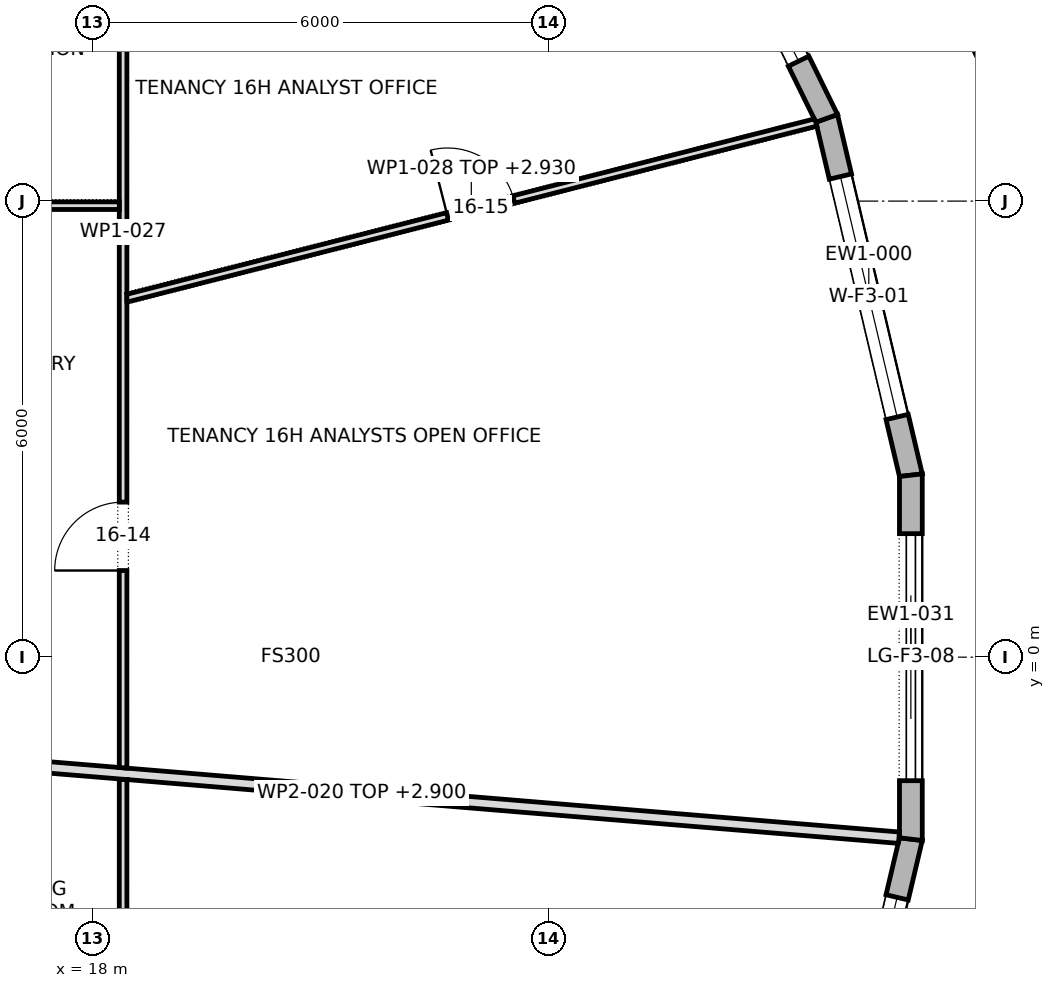
"""IFC4 building model, lengths in metres.
Left out: names, types, materials, properties, quantities, classifications, styles, units other than length and angle.
Written with IfcOpenShell. Run it as: python <this file> out.ifc"""

import sys

from ifc_helpers import new_model, si_unit, direction, frame, frame_2d, origin, origin_2d, place, context, subcontext, project, spatial, polyline, rectangle, outline, extrude, element, fill, save


model = new_model("IFC4")
c1 = context("Model", 3, precision=1e-05, world=origin(), true_north=direction((0.0, 1.0)))
c2 = subcontext(c1, "Body", "Model", "MODEL_VIEW")
j1 = project(units=[si_unit("LENGTHUNIT", "METRE"), si_unit("PLANEANGLEUNIT", "RADIAN")], contexts=[c1])
p1 = place(None, origin())
s1 = spatial("IfcSite", under=j1, at=p1, CompositionType="ELEMENT")
p2 = place(p1, origin())
s2 = spatial("IfcBuilding", under=s1, at=p2, CompositionType="ELEMENT")
p3 = place(p2, frame((0.0, 0.0, 226.9)))
s3 = spatial("IfcBuildingStorey", under=s2, at=p3, CompositionType="ELEMENT", Elevation=226.9)
p4 = place(p3, frame((30.194, 7.851, 0.0), z_axis=(0.0, 0.0, 1.0), x_axis=(-0.333630814899, 0.942703813162, 0.0)))
e1 = element("IfcColumn", 1, at=p4, inside=s3, PredefinedType="COLUMN", context=c2, shape_type="SweptSolid", body=[
    extrude(rectangle(XDim=1.2, YDim=1.0, at=origin_2d()), origin(), (0.0, 0.0, 1.0), 4.0),
])
p5 = place(p3, frame((28.764, 2.394, 0.0), z_axis=(0.0, 0.0, 1.0), x_axis=(-0.229617574796, 0.97328093033, 0.0)))
e2 = element("IfcWall", 2, at=p5, inside=s3, PredefinedType="STANDARD", context=c2, shape_type="SweptSolid", body=[
    extrude(outline(polyline([(-0.017, -0.15), (4.841, -0.15), (4.807, 0.15), (0.017, 0.15), (-0.017, -0.15)])), origin(), (0.0, 0.0, 1.0), 3.7),
])
p6 = place(p5, frame((0.787, 0.0, 0.6)))
e3 = element("IfcOpeningElement", 3, at=p6, cuts=e2, PredefinedType="OPENING", context=c2, shape_type="SweptSolid", body=[
    extrude(rectangle(XDim=3.25, YDim=2.65, at=frame_2d((1.625, 1.325))), frame((0.0, 0.162, 0.0), z_axis=(0.0, -1.0, 0.0), x_axis=(1.0, 0.0, 0.0)), (0.0, 0.0, 1.0), 0.324),
])
p7 = place(p3, frame((27.656, 7.089, 0.0), z_axis=(0.0, 0.0, 1.0), x_axis=(-0.440857641837, 0.897577038272, 0.0)))
e4 = element("IfcWall", 4, at=p7, inside=s3, PredefinedType="STANDARD", context=c2, shape_type="SweptSolid", body=[
    extrude(outline(polyline([(-0.017, -0.15), (4.941, -0.15), (4.909, 0.15), (0.017, 0.15), (-0.017, -0.15)])), origin(), (0.0, 0.0, 1.0), 3.7),
])
p8 = place(p7, frame((0.838, 0.0, 0.6)))
e5 = element("IfcOpeningElement", 5, at=p8, cuts=e4, PredefinedType="OPENING", context=c2, shape_type="SweptSolid", body=[
    extrude(rectangle(XDim=3.25, YDim=2.65, at=frame_2d((1.625, 1.325))), frame((0.0, 0.162, 0.0), z_axis=(0.0, -1.0, 0.0), x_axis=(1.0, 0.0, 0.0)), (0.0, 0.0, 1.0), 0.324),
])
p9 = place(p3, frame((27.656, -7.089, 0.0), z_axis=(0.0, 0.0, 1.0), x_axis=(0.229617574796, 0.97328093033, 0.0)))
e6 = element("IfcWall", 6, at=p9, inside=s3, PredefinedType="STANDARD", context=c2, shape_type="SweptSolid", body=[
    extrude(outline(polyline([(-0.017, -0.15), (4.841, -0.15), (4.807, 0.15), (0.017, 0.15), (-0.017, -0.15)])), origin(), (0.0, 0.0, 1.0), 3.7),
])
p10 = place(p9, frame((0.787, 0.0, 0.6)))
e7 = element("IfcOpeningElement", 7, at=p10, cuts=e6, PredefinedType="OPENING", context=c2, shape_type="SweptSolid", body=[
    extrude(rectangle(XDim=3.25, YDim=2.65, at=frame_2d((1.625, 1.325))), frame((0.0, 0.162, 0.0), z_axis=(0.0, -1.0, 0.0), x_axis=(1.0, 0.0, 0.0)), (0.0, 0.0, 1.0), 0.324),
])
p11 = place(p3, frame((28.764, -2.394, 0.0), z_axis=(0.0, 0.0, 1.0), x_axis=(0.0, 1.0, 0.0)))
e8 = element("IfcWall", 8, at=p11, inside=s3, PredefinedType="STANDARD", context=c2, shape_type="SweptSolid", body=[
    extrude(outline(polyline([(-0.017, -0.15), (4.805, -0.15), (4.77, 0.15), (0.017, 0.15), (-0.017, -0.15)])), origin(), (0.0, 0.0, 1.0), 3.7),
])
p12 = place(p11, frame((0.769, 0.0, 0.0)))
e9 = element("IfcOpeningElement", 9, at=p12, cuts=e8, PredefinedType="OPENING", context=c2, shape_type="SweptSolid", body=[
    extrude(rectangle(XDim=3.25, YDim=3.25, at=frame_2d((1.625, 1.625))), frame((0.0, 0.162, 0.0), z_axis=(0.0, -1.0, 0.0), x_axis=(1.0, 0.0, 0.0)), (0.0, 0.0, 1.0), 0.324),
])
p13 = place(p3, frame((14.466, -1.206, 0.0), z_axis=(0.0, 0.0, 1.0), x_axis=(0.996598124583, -0.082414671491, 0.0)))
e10 = element("IfcWall", 10, at=p13, inside=s3, PredefinedType="PARTITIONING", context=c2, shape_type="SweptSolid", body=[
    extrude(outline(polyline([(0.0, -0.075), (1.334, -0.075), (2.667, -0.075), (4.001, -0.075), (4.003, -0.075), (4.003, -0.075), (5.7, -0.075), (7.397, -0.075), (9.094, -0.075), (10.791, -0.075), (12.488, -0.075), (14.185, -0.075), (14.19, -0.044), (14.19, 0.075), (12.475, 0.075), (10.761, 0.075), (9.046, 0.075), (7.332, 0.075), (5.617, 0.075), (3.903, 0.075), (3.891, 0.074), (3.891, 0.075), (1.947, 0.075), (0.002, 0.075), (0.008, 0.006), (0.0, 0.006), (0.0, -0.075)])), origin(), (0.0, 0.0, 1.0), 2.9),
])
p14 = place(p3, frame((18.4, -12.73, 0.0), z_axis=(0.0, 0.0, 1.0), x_axis=(0.0, 1.0, 0.0)))
e11 = element("IfcWall", 11, at=p14, inside=s3, PredefinedType="PARTITIONING", context=c2, shape_type="SweptSolid", body=[
    extrude(rectangle(XDim=11.12, YDim=0.1, at=frame_2d((5.56, 0.0))), origin(), (0.0, 0.0, 1.0), 3.7),
])
p15 = place(p14, frame((3.365, 0.0, 0.0)))
e12 = element("IfcOpeningElement", 12, at=p15, cuts=e11, PredefinedType="OPENING", context=c2, shape_type="SweptSolid", body=[
    extrude(rectangle(XDim=0.9, YDim=2.1, at=frame_2d((0.45, 1.05))), frame((0.0, 0.062, 0.0), z_axis=(0.0, -1.0, 0.0), x_axis=(1.0, 0.0, 0.0)), (0.0, 0.0, 1.0), 0.124),
])
p16 = place(p3, frame((18.4, -1.459, 0.0), z_axis=(0.0, 0.0, 1.0), x_axis=(0.0, 1.0, 0.0)))
e13 = element("IfcWall", 13, at=p16, inside=s3, PredefinedType="PARTITIONING", context=c2, shape_type="SweptSolid", body=[
    extrude(outline(polyline([(0.0, -0.05), (1.557, -0.05), (3.113, -0.05), (4.67, -0.05), (6.227, -0.05), (6.233, -0.048), (6.234, -0.05), (8.027, -0.05), (9.821, -0.05), (9.826, -0.048), (9.827, -0.05), (11.268, -0.05), (12.709, -0.05), (14.151, -0.05), (14.151, -0.05), (14.145, -0.04), (14.151, -0.036), (14.151, -0.034), (14.138, -0.043), (14.073, 0.05), (12.417, 0.05), (10.761, 0.05), (9.105, 0.05), (7.449, 0.05), (7.449, 0.05), (7.349, 0.05), (7.349, 0.05), (5.514, 0.05), (3.679, 0.05), (1.844, 0.05), (0.008, 0.05), (0.0, -0.048), (0.0, -0.05)])), origin(), (0.0, 0.0, 1.0), 3.7),
])
p17 = place(p16, frame((2.6, 0.0, 0.0)))
e14 = element("IfcOpeningElement", 14, at=p17, cuts=e13, PredefinedType="OPENING", context=c2, shape_type="SweptSolid", body=[
    extrude(rectangle(XDim=0.9, YDim=2.1, at=frame_2d((0.45, 1.05))), frame((0.0, 0.062, 0.0), z_axis=(0.0, -1.0, 0.0), x_axis=(1.0, 0.0, 0.0)), (0.0, 0.0, 1.0), 0.124),
])
p18 = place(p3, frame((18.438, 4.719, 0.0), z_axis=(0.0, 0.0, 1.0), x_axis=(0.968975503795, 0.247156778269, 0.0)))
e15 = element("IfcWall", 15, at=p18, inside=s3, PredefinedType="PARTITIONING", context=c2, shape_type="SweptSolid", body=[
    extrude(outline(polyline([(9.367, -0.05), (9.367, 0.008), (9.358, 0.05), (7.492, 0.05), (5.625, 0.05), (3.759, 0.05), (1.892, 0.05), (0.025, 0.05), (0.0, -0.05), (0.0, -0.05), (1.874, -0.05), (3.747, -0.05), (5.62, -0.05), (7.494, -0.05), (9.367, -0.05)])), origin(), (0.0, 0.0, 1.0), 2.93),
])
p19 = place(p18, frame((4.367, 0.0, 0.0)))
e16 = element("IfcOpeningElement", 16, at=p19, cuts=e15, PredefinedType="OPENING", context=c2, shape_type="SweptSolid", body=[
    extrude(rectangle(XDim=0.9, YDim=2.1, at=frame_2d((0.45, 1.05))), frame((0.0, 0.062, 0.0), z_axis=(0.0, -1.0, 0.0), x_axis=(1.0, 0.0, 0.0)), (0.0, 0.0, 1.0), 0.124),
])
p20 = place(p3, frame((18.35, 5.94, 0.0), z_axis=(0.0, 0.0, 1.0), x_axis=(-1.0, 0.0, 0.0)))
e17 = element("IfcWall", 17, at=p20, inside=s3, PredefinedType="PARTITIONING", context=c2, shape_type="SweptSolid", body=[
    extrude(rectangle(XDim=3.875, YDim=0.1, at=frame_2d((1.938, 0.0))), origin(), (0.0, 0.0, 1.0), 3.7),
])
p21 = place(p6, origin())
e18 = element("IfcWindow", 18, at=p21, inside=s3, PartitioningType="TRIPLE_PANEL_VERTICAL", PredefinedType="WINDOW", context=c2, shape_type="SweptSolid", body=[
    extrude(rectangle(XDim=3.25, YDim=2.65, at=frame_2d((1.625, 1.325))), frame((0.0, 0.03, 0.0), z_axis=(0.0, -1.0, 0.0), x_axis=(1.0, 0.0, 0.0)), (0.0, 0.0, 1.0), 0.06),
])
fill(e3, e18)
p22 = place(p8, origin())
e19 = element("IfcWindow", 19, at=p22, inside=s3, PartitioningType="TRIPLE_PANEL_VERTICAL", PredefinedType="WINDOW", context=c2, shape_type="SweptSolid", body=[
    extrude(rectangle(XDim=3.25, YDim=2.65, at=frame_2d((1.625, 1.325))), frame((0.0, 0.03, 0.0), z_axis=(0.0, -1.0, 0.0), x_axis=(1.0, 0.0, 0.0)), (0.0, 0.0, 1.0), 0.06),
])
fill(e5, e19)
p23 = place(p10, origin())
e20 = element("IfcWindow", 20, at=p23, inside=s3, PartitioningType="TRIPLE_PANEL_VERTICAL", PredefinedType="WINDOW", context=c2, shape_type="SweptSolid", body=[
    extrude(rectangle(XDim=3.25, YDim=2.65, at=frame_2d((1.625, 1.325))), frame((0.0, 0.03, 0.0), z_axis=(0.0, -1.0, 0.0), x_axis=(1.0, 0.0, 0.0)), (0.0, 0.0, 1.0), 0.06),
])
fill(e7, e20)
p24 = place(p12, origin())
e21 = element("IfcDoor", 21, at=p24, inside=s3, OperationType="DOUBLE_DOOR_SLIDING", PredefinedType="DOOR", context=c2, shape_type="SweptSolid", body=[
    extrude(rectangle(XDim=3.25, YDim=3.25, at=frame_2d((1.625, 1.625))), frame((0.0, 0.025, 0.0), z_axis=(0.0, -1.0, 0.0), x_axis=(1.0, 0.0, 0.0)), (0.0, 0.0, 1.0), 0.05),
])
fill(e9, e21)
p25 = place(p17, origin())
e22 = element("IfcDoor", 22, at=p25, inside=s3, OperationType="SINGLE_SWING_RIGHT", PredefinedType="DOOR", context=c2, shape_type="SweptSolid", body=[
    extrude(rectangle(XDim=0.9, YDim=2.1, at=frame_2d((0.45, 1.05))), frame((0.0, 0.025, 0.0), z_axis=(0.0, -1.0, 0.0), x_axis=(1.0, 0.0, 0.0)), (0.0, 0.0, 1.0), 0.05),
])
fill(e14, e22)
p26 = place(p19, origin())
e23 = element("IfcDoor", 23, at=p26, inside=s3, OperationType="SINGLE_SWING_RIGHT", PredefinedType="DOOR", context=c2, shape_type="SweptSolid", body=[
    extrude(rectangle(XDim=0.9, YDim=2.1, at=frame_2d((0.45, 1.05))), frame((0.0, 0.025, 0.0), z_axis=(0.0, -1.0, 0.0), x_axis=(1.0, 0.0, 0.0)), (0.0, 0.0, 1.0), 0.05),
])
fill(e16, e23)
save(model, sys.argv[1])
